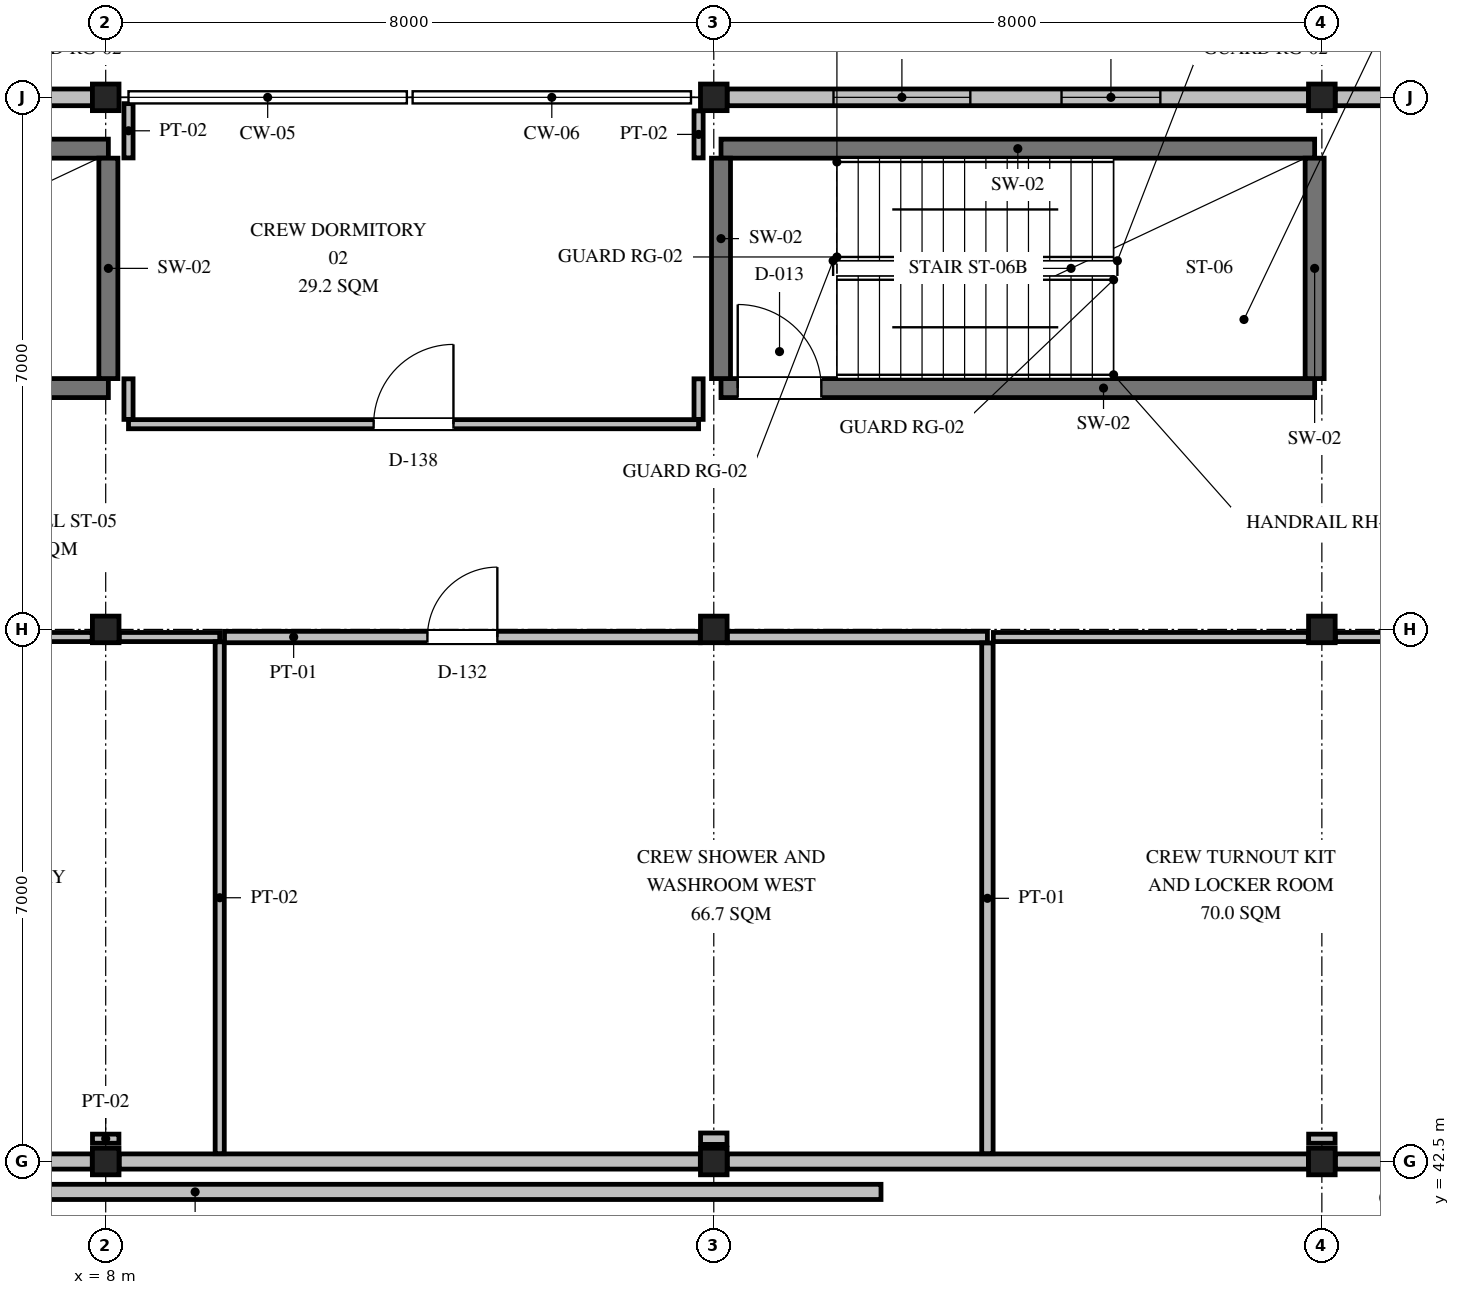
"""IFC4 building model, lengths in metres.
Left out: names, types, materials, properties, quantities, classifications, styles, units other than length and angle.
Written with IfcOpenShell. Run it as: python <this file> out.ifc"""

import sys

from ifc_helpers import new_model, si_unit, direction, frame, frame_2d, origin, origin_2d, place, context, subcontext, project, spatial, rectangle, i_section, extrude, element, fill, save


model = new_model("IFC4")
c1 = context("Model", 3, precision=1e-05, world=origin(), true_north=direction((0.0, 1.0)))
c2 = subcontext(c1, "Body", "Model", "MODEL_VIEW")
j1 = project(units=[si_unit("LENGTHUNIT", "METRE"), si_unit("PLANEANGLEUNIT", "RADIAN")], contexts=[c1])
p1 = place(None, origin())
s1 = spatial("IfcSite", under=j1, at=p1, CompositionType="ELEMENT")
p2 = place(p1, origin())
s2 = spatial("IfcBuilding", under=s1, at=p2, CompositionType="ELEMENT")
p3 = place(p2, frame((0.0, 0.0, 5.85)))
s3 = spatial("IfcBuildingStorey", under=s2, at=p3, CompositionType="ELEMENT", Elevation=5.85)
for number, where, z_axis, x_axis in (
    (1, (8.0, 42.5, 0.0), (0.0, 0.0, 1.0), (1.0, 0.0, 0.0)),
    (2, (8.0, 49.5, 0.0), (0.0, 0.0, 1.0), (1.0, 0.0, 0.0)),
    (3, (8.0, 56.5, 0.0), (0.0, 0.0, 1.0), (1.0, 0.0, 0.0)),
    (4, (16.0, 42.5, 0.0), (0.0, 0.0, 1.0), (1.0, 0.0, 0.0)),
    (5, (16.0, 49.5, 0.0), (0.0, 0.0, 1.0), (1.0, 0.0, 0.0)),
    (6, (16.0, 56.5, 0.0), (0.0, 0.0, 1.0), (1.0, 0.0, 0.0)),
    (7, (24.0, 42.5, 0.0), (0.0, 0.0, 1.0), (1.0, 0.0, 0.0)),
    (8, (24.0, 49.5, 0.0), (0.0, 0.0, 1.0), (1.0, 0.0, 0.0)),
    (9, (24.0, 56.5, 0.0), (0.0, 0.0, 1.0), (1.0, 0.0, 0.0)),
):
    element("IfcColumn", number, at=place(p3, frame(where, z_axis=z_axis, x_axis=x_axis)), inside=s3, PredefinedType="COLUMN", context=c2, shape_type="SweptSolid", body=[
        extrude(i_section(OverallWidth=0.35, OverallDepth=0.35, WebThickness=0.012, FlangeThickness=0.019, FilletRadius=0.02, at=origin_2d()), origin(), (0.0, 0.0, 1.0), 4.2),
    ])
p4 = place(p3, frame((0.175, 56.5, 0.0), z_axis=(0.0, 0.0, 1.0), x_axis=(1.0, 0.0, 0.0)))
e10 = element("IfcWall", 10, at=p4, inside=s3, PredefinedType="SOLIDWALL", context=c2, shape_type="SweptSolid", body=[
    extrude(rectangle(XDim=7.65, YDim=0.22, at=frame_2d((3.825, 0.0))), origin(), (0.0, 0.0, 1.0), 3.194),
])
p5 = place(p4, frame((1.4, 0.0, 0.95)))
e11 = element("IfcOpeningElement", 11, at=p5, cuts=e10, PredefinedType="OPENING", context=c2, shape_type="SweptSolid", body=[
    extrude(rectangle(XDim=1.0, YDim=1.5, at=frame_2d((0.5, 0.75))), frame((0.0, 0.12, 0.0), z_axis=(0.0, -1.0, 0.0), x_axis=(1.0, 0.0, 0.0)), (0.0, 0.0, 1.0), 0.24),
])
p6 = place(p4, frame((4.4, 0.0, 0.95)))
e12 = element("IfcOpeningElement", 12, at=p6, cuts=e10, PredefinedType="OPENING", context=c2, shape_type="SweptSolid", body=[
    extrude(rectangle(XDim=2.2, YDim=1.8, at=frame_2d((1.1, 0.9))), frame((0.0, 0.12, 0.0), z_axis=(0.0, -1.0, 0.0), x_axis=(1.0, 0.0, 0.0)), (0.0, 0.0, 1.0), 0.24),
])
p7 = place(p3, frame((16.175, 56.5, 0.0), z_axis=(0.0, 0.0, 1.0), x_axis=(1.0, 0.0, 0.0)))
e13 = element("IfcWall", 13, at=p7, inside=s3, PredefinedType="SOLIDWALL", context=c2, shape_type="SweptSolid", body=[
    extrude(rectangle(XDim=7.65, YDim=0.22, at=frame_2d((3.825, 0.0))), origin(), (0.0, 0.0, 1.0), 2.894),
])
p8 = place(p7, frame((1.4, 0.0, 0.95)))
e14 = element("IfcOpeningElement", 14, at=p8, cuts=e13, PredefinedType="OPENING", context=c2, shape_type="SweptSolid", body=[
    extrude(rectangle(XDim=1.8, YDim=1.5, at=frame_2d((0.9, 0.75))), frame((0.0, 0.12, 0.0), z_axis=(0.0, -1.0, 0.0), x_axis=(1.0, 0.0, 0.0)), (0.0, 0.0, 1.0), 0.24),
])
p9 = place(p7, frame((4.4, 0.0, 0.694)))
e15 = element("IfcOpeningElement", 15, at=p9, cuts=e13, PredefinedType="OPENING", context=c2, shape_type="SweptSolid", body=[
    extrude(rectangle(XDim=1.3, YDim=2.0, at=frame_2d((0.65, 1.0))), frame((0.0, 0.12, 0.0), z_axis=(0.0, -1.0, 0.0), x_axis=(1.0, 0.0, 0.0)), (0.0, 0.0, 1.0), 0.24),
])
p10 = place(p3, frame((24.175, 56.5, 0.0), z_axis=(0.0, 0.0, 1.0), x_axis=(1.0, 0.0, 0.0)))
e16 = element("IfcWall", 16, at=p10, inside=s3, PredefinedType="SOLIDWALL", context=c2, shape_type="SweptSolid", body=[
    extrude(rectangle(XDim=7.65, YDim=0.22, at=frame_2d((3.825, 0.0))), origin(), (0.0, 0.0, 1.0), 3.344),
])
p11 = place(p10, frame((1.4, 0.0, 0.95)))
e17 = element("IfcOpeningElement", 17, at=p11, cuts=e16, PredefinedType="OPENING", context=c2, shape_type="SweptSolid", body=[
    extrude(rectangle(XDim=2.4, YDim=1.5, at=frame_2d((1.2, 0.75))), frame((0.0, 0.12, 0.0), z_axis=(0.0, -1.0, 0.0), x_axis=(1.0, 0.0, 0.0)), (0.0, 0.0, 1.0), 0.24),
])
p12 = place(p10, frame((4.4, 0.0, 0.95)))
e18 = element("IfcOpeningElement", 18, at=p12, cuts=e16, PredefinedType="OPENING", context=c2, shape_type="SweptSolid", body=[
    extrude(rectangle(XDim=2.1, YDim=2.1, at=frame_2d((1.05, 1.05))), frame((0.0, 0.12, 0.0), z_axis=(0.0, -1.0, 0.0), x_axis=(1.0, 0.0, 0.0)), (0.0, 0.0, 1.0), 0.24),
])
p13 = place(p3, frame((0.225, 52.675, 0.0), z_axis=(0.0, 0.0, 1.0), x_axis=(1.0, 0.0, 0.0)))
e19 = element("IfcWall", 19, at=p13, inside=s3, PredefinedType="SHEAR", context=c2, shape_type="SweptSolid", body=[
    extrude(rectangle(XDim=7.81, YDim=0.25, at=frame_2d((3.905, 0.0))), origin(), (0.0, 0.0, 1.0), 4.0),
])
p14 = place(p13, frame((0.22, 0.0, 0.0)))
e20 = element("IfcOpeningElement", 20, at=p14, cuts=e19, PredefinedType="OPENING", context=c2, shape_type="SweptSolid", body=[
    extrude(rectangle(XDim=1.1, YDim=2.15, at=frame_2d((0.55, 1.075))), frame((0.0, 0.135, 0.0), z_axis=(0.0, -1.0, 0.0), x_axis=(1.0, 0.0, 0.0)), (0.0, 0.0, 1.0), 0.27),
])
p15 = place(p3, frame((0.225, 55.825, 0.0), z_axis=(0.0, 0.0, 1.0), x_axis=(1.0, 0.0, 0.0)))
e21 = element("IfcWall", 21, at=p15, inside=s3, PredefinedType="SHEAR", context=c2, shape_type="SweptSolid", body=[
    extrude(rectangle(XDim=7.81, YDim=0.25, at=frame_2d((3.905, 0.0))), origin(), (0.0, 0.0, 1.0), 4.0),
])
p16 = place(p3, frame((8.035, 52.8, 0.0), z_axis=(0.0, 0.0, 1.0), x_axis=(0.0, 1.0, 0.0)))
e22 = element("IfcWall", 22, at=p16, inside=s3, PredefinedType="SHEAR", context=c2, shape_type="SweptSolid", body=[
    extrude(rectangle(XDim=2.9, YDim=0.25, at=frame_2d((1.45, 0.0))), origin(), (0.0, 0.0, 1.0), 4.0),
])
p17 = place(p3, frame((16.095, 52.675, 0.0), z_axis=(0.0, 0.0, 1.0), x_axis=(1.0, 0.0, 0.0)))
e23 = element("IfcWall", 23, at=p17, inside=s3, PredefinedType="SHEAR", context=c2, shape_type="SweptSolid", body=[
    extrude(rectangle(XDim=7.81, YDim=0.25, at=frame_2d((3.905, 0.0))), origin(), (0.0, 0.0, 1.0), 4.0),
])
p18 = place(p17, frame((0.22, 0.0, 0.0)))
e24 = element("IfcOpeningElement", 24, at=p18, cuts=e23, PredefinedType="OPENING", context=c2, shape_type="SweptSolid", body=[
    extrude(rectangle(XDim=1.1, YDim=2.15, at=frame_2d((0.55, 1.075))), frame((0.0, 0.135, 0.0), z_axis=(0.0, -1.0, 0.0), x_axis=(1.0, 0.0, 0.0)), (0.0, 0.0, 1.0), 0.27),
])
p19 = place(p3, frame((16.095, 55.825, 0.0), z_axis=(0.0, 0.0, 1.0), x_axis=(1.0, 0.0, 0.0)))
e25 = element("IfcWall", 25, at=p19, inside=s3, PredefinedType="SHEAR", context=c2, shape_type="SweptSolid", body=[
    extrude(rectangle(XDim=7.81, YDim=0.25, at=frame_2d((3.905, 0.0))), origin(), (0.0, 0.0, 1.0), 4.0),
])
for number, where, z_axis, x_axis in (
    (26, (16.095, 52.8, 0.0), (0.0, 0.0, 1.0), (0.0, 1.0, 0.0)),
    (27, (23.905, 52.8, 0.0), (0.0, 0.0, 1.0), (0.0, 1.0, 0.0)),
):
    element("IfcWall", number, at=place(p3, frame(where, z_axis=z_axis, x_axis=x_axis)), inside=s3, PredefinedType="SHEAR", context=c2, shape_type="SweptSolid", body=[
        extrude(rectangle(XDim=2.9, YDim=0.25, at=frame_2d((1.45, 0.0))), origin(), (0.0, 0.0, 1.0), 4.0),
    ])
p20 = place(p3, frame((0.177, 42.5, 0.0), z_axis=(0.0, 0.0, 1.0), x_axis=(1.0, 0.0, 0.0)))
e28 = element("IfcWall", 28, at=p20, inside=s3, PredefinedType="PARTITIONING", context=c2, shape_type="SweptSolid", body=[
    extrude(rectangle(XDim=7.646, YDim=0.2, at=frame_2d((3.823, 0.0))), origin(), (0.0, 0.0, 1.0), 3.494),
])
p21 = place(p3, frame((8.177, 42.5, 0.0), z_axis=(0.0, 0.0, 1.0), x_axis=(1.0, 0.0, 0.0)))
e29 = element("IfcWall", 29, at=p21, inside=s3, PredefinedType="PARTITIONING", context=c2, shape_type="SweptSolid", body=[
    extrude(rectangle(XDim=7.646, YDim=0.2, at=frame_2d((3.823, 0.0))), origin(), (0.0, 0.0, 1.0), 3.544),
])
p22 = place(p3, frame((16.177, 42.5, 0.0), z_axis=(0.0, 0.0, 1.0), x_axis=(1.0, 0.0, 0.0)))
e30 = element("IfcWall", 30, at=p22, inside=s3, PredefinedType="PARTITIONING", context=c2, shape_type="SweptSolid", body=[
    extrude(rectangle(XDim=7.646, YDim=0.2, at=frame_2d((3.823, 0.0))), origin(), (0.0, 0.0, 1.0), 3.494),
])
p23 = place(p3, frame((24.177, 42.5, 0.0), z_axis=(0.0, 0.0, 1.0), x_axis=(1.0, 0.0, 0.0)))
e31 = element("IfcWall", 31, at=p23, inside=s3, PredefinedType="PARTITIONING", context=c2, shape_type="SweptSolid", body=[
    extrude(rectangle(XDim=7.646, YDim=0.2, at=frame_2d((3.823, 0.0))), origin(), (0.0, 0.0, 1.0), 3.594),
])
p24 = place(p3, frame((0.153, 42.1, 0.0), z_axis=(0.0, 0.0, 1.0), x_axis=(1.0, 0.0, 0.0)))
e32 = element("IfcWall", 32, at=p24, inside=s3, PredefinedType="PARTITIONING", context=c2, shape_type="SweptSolid", body=[
    extrude(rectangle(XDim=18.047, YDim=0.2, at=frame_2d((9.023, 0.0))), origin(), (0.0, 0.0, 1.0), 4.0),
])
p25 = place(p3, frame((7.826, 42.8, 0.0), z_axis=(0.0, 0.0, 1.0), x_axis=(1.0, 0.0, 0.0)))
e33 = element("IfcWall", 33, at=p25, inside=s3, PredefinedType="PARTITIONING", context=c2, shape_type="SweptSolid", body=[
    extrude(rectangle(XDim=0.348, YDim=0.12, at=frame_2d((0.174, 0.0))), origin(), (0.0, 0.0, 1.0), 4.0),
])
p26 = place(p3, frame((0.178, 49.4, 0.0), z_axis=(0.0, 0.0, 1.0), x_axis=(1.0, 0.0, 0.0)))
e34 = element("IfcWall", 34, at=p26, inside=s3, PredefinedType="PARTITIONING", context=c2, shape_type="SweptSolid", body=[
    extrude(rectangle(XDim=7.644, YDim=0.12, at=frame_2d((3.822, 0.0))), origin(), (0.0, 0.0, 1.0), 3.344),
])
p27 = place(p26, frame((3.297, 0.0, 0.0)))
e35 = element("IfcOpeningElement", 35, at=p27, cuts=e34, PredefinedType="OPENING", context=c2, shape_type="SweptSolid", body=[
    extrude(rectangle(XDim=1.05, YDim=2.1, at=frame_2d((0.525, 1.05))), frame((0.0, 0.07, 0.0), z_axis=(0.0, -1.0, 0.0), x_axis=(1.0, 0.0, 0.0)), (0.0, 0.0, 1.0), 0.14),
])
p28 = place(p3, frame((8.178, 49.4, 0.0), z_axis=(0.0, 0.0, 1.0), x_axis=(1.0, 0.0, 0.0)))
e36 = element("IfcWall", 36, at=p28, inside=s3, PredefinedType="PARTITIONING", context=c2, shape_type="SweptSolid", body=[
    extrude(rectangle(XDim=1.322, YDim=0.12, at=frame_2d((0.661, 0.0))), origin(), (0.0, 0.0, 1.0), 3.394),
])
p29 = place(p3, frame((9.5, 42.603, 0.0), z_axis=(0.0, 0.0, 1.0), x_axis=(0.0, 1.0, 0.0)))
e37 = element("IfcWall", 37, at=p29, inside=s3, PredefinedType="PARTITIONING", context=c2, shape_type="SweptSolid", body=[
    extrude(rectangle(XDim=6.734, YDim=0.12, at=frame_2d((3.367, 0.0))), origin(), (0.0, 0.0, 1.0), 3.7),
])
p30 = place(p3, frame((15.826, 42.8, 0.0), z_axis=(0.0, 0.0, 1.0), x_axis=(1.0, 0.0, 0.0)))
e38 = element("IfcWall", 38, at=p30, inside=s3, PredefinedType="PARTITIONING", context=c2, shape_type="SweptSolid", body=[
    extrude(rectangle(XDim=0.348, YDim=0.15, at=frame_2d((0.174, 0.0))), origin(), (0.0, 0.0, 1.0), 4.0),
])
p31 = place(p3, frame((9.563, 49.4, 0.0), z_axis=(0.0, 0.0, 1.0), x_axis=(1.0, 0.0, 0.0)))
e39 = element("IfcWall", 39, at=p31, inside=s3, PredefinedType="PARTITIONING", context=c2, shape_type="SweptSolid", body=[
    extrude(rectangle(XDim=6.259, YDim=0.15, at=frame_2d((3.129, 0.0))), origin(), (0.0, 0.0, 1.0), 3.394),
])
p32 = place(p31, frame((2.669, 0.0, 0.0)))
e40 = element("IfcOpeningElement", 40, at=p32, cuts=e39, PredefinedType="OPENING", context=c2, shape_type="SweptSolid", body=[
    extrude(rectangle(XDim=0.92, YDim=2.1, at=frame_2d((0.46, 1.05))), frame((0.0, 0.085, 0.0), z_axis=(0.0, -1.0, 0.0), x_axis=(1.0, 0.0, 0.0)), (0.0, 0.0, 1.0), 0.17),
])
p33 = place(p3, frame((16.178, 49.4, 0.0), z_axis=(0.0, 0.0, 1.0), x_axis=(1.0, 0.0, 0.0)))
e41 = element("IfcWall", 41, at=p33, inside=s3, PredefinedType="PARTITIONING", context=c2, shape_type="SweptSolid", body=[
    extrude(rectangle(XDim=3.422, YDim=0.15, at=frame_2d((1.711, 0.0))), origin(), (0.0, 0.0, 1.0), 3.444),
])
p34 = place(p3, frame((19.6, 42.603, 0.0), z_axis=(0.0, 0.0, 1.0), x_axis=(0.0, 1.0, 0.0)))
e42 = element("IfcWall", 42, at=p34, inside=s3, PredefinedType="PARTITIONING", context=c2, shape_type="SweptSolid", body=[
    extrude(rectangle(XDim=6.719, YDim=0.15, at=frame_2d((3.359, 0.0))), origin(), (0.0, 0.0, 1.0), 4.0),
])
p35 = place(p3, frame((23.826, 42.8, 0.0), z_axis=(0.0, 0.0, 1.0), x_axis=(1.0, 0.0, 0.0)))
e43 = element("IfcWall", 43, at=p35, inside=s3, PredefinedType="PARTITIONING", context=c2, shape_type="SweptSolid", body=[
    extrude(rectangle(XDim=0.348, YDim=0.12, at=frame_2d((0.174, 0.0))), origin(), (0.0, 0.0, 1.0), 4.0),
])
p36 = place(p3, frame((19.678, 49.4, 0.0), z_axis=(0.0, 0.0, 1.0), x_axis=(1.0, 0.0, 0.0)))
e44 = element("IfcWall", 44, at=p36, inside=s3, PredefinedType="PARTITIONING", context=c2, shape_type="SweptSolid", body=[
    extrude(rectangle(XDim=4.144, YDim=0.12, at=frame_2d((2.072, 0.0))), origin(), (0.0, 0.0, 1.0), 3.444),
])
p37 = place(p3, frame((24.178, 49.4, 0.0), z_axis=(0.0, 0.0, 1.0), x_axis=(1.0, 0.0, 0.0)))
e45 = element("IfcWall", 45, at=p37, inside=s3, PredefinedType="PARTITIONING", context=c2, shape_type="SweptSolid", body=[
    extrude(rectangle(XDim=6.022, YDim=0.12, at=frame_2d((3.011, 0.0))), origin(), (0.0, 0.0, 1.0), 3.494),
])
p38 = place(p37, frame((2.261, 0.0, 0.0)))
e46 = element("IfcOpeningElement", 46, at=p38, cuts=e45, PredefinedType="OPENING", context=c2, shape_type="SweptSolid", body=[
    extrude(rectangle(XDim=1.5, YDim=2.25, at=frame_2d((0.75, 1.125))), frame((0.0, 0.07, 0.0), z_axis=(0.0, -1.0, 0.0), x_axis=(1.0, 0.0, 0.0)), (0.0, 0.0, 1.0), 0.14),
])
p39 = place(p3, frame((8.3, 52.2, 0.0), z_axis=(0.0, 0.0, 1.0), x_axis=(1.0, 0.0, 0.0)))
e47 = element("IfcWall", 47, at=p39, inside=s3, PredefinedType="PARTITIONING", context=c2, shape_type="SweptSolid", body=[
    extrude(rectangle(XDim=7.5, YDim=0.12, at=frame_2d((3.75, 0.0))), origin(), (0.0, 0.0, 1.0), 4.0),
])
p40 = place(p39, frame((3.225, 0.0, 0.0)))
e48 = element("IfcOpeningElement", 48, at=p40, cuts=e47, PredefinedType="OPENING", context=c2, shape_type="SweptSolid", body=[
    extrude(rectangle(XDim=1.05, YDim=2.1, at=frame_2d((0.525, 1.05))), frame((0.0, 0.07, 0.0), z_axis=(0.0, -1.0, 0.0), x_axis=(1.0, 0.0, 0.0)), (0.0, 0.0, 1.0), 0.14),
])
p41 = place(p3, frame((8.3, 52.263, 0.0), z_axis=(0.0, 0.0, 1.0), x_axis=(0.0, 1.0, 0.0)))
e49 = element("IfcWall", 49, at=p41, inside=s3, PredefinedType="PARTITIONING", context=c2, shape_type="SweptSolid", body=[
    extrude(rectangle(XDim=0.534, YDim=0.12, at=frame_2d((0.267, 0.0))), origin(), (0.0, 0.0, 1.0), 4.0),
])
p42 = place(p3, frame((8.3, 55.703, 0.0), z_axis=(0.0, 0.0, 1.0), x_axis=(0.0, 1.0, 0.0)))
e50 = element("IfcWall", 50, at=p42, inside=s3, PredefinedType="PARTITIONING", context=c2, shape_type="SweptSolid", body=[
    extrude(rectangle(XDim=0.714, YDim=0.12, at=frame_2d((0.357, 0.0))), origin(), (0.0, 0.0, 1.0), 4.0),
])
p43 = place(p3, frame((15.8, 52.263, 0.0), z_axis=(0.0, 0.0, 1.0), x_axis=(0.0, 1.0, 0.0)))
e51 = element("IfcWall", 51, at=p43, inside=s3, PredefinedType="PARTITIONING", context=c2, shape_type="SweptSolid", body=[
    extrude(rectangle(XDim=0.534, YDim=0.12, at=frame_2d((0.267, 0.0))), origin(), (0.0, 0.0, 1.0), 4.0),
])
p44 = place(p3, frame((15.8, 55.703, 0.0), z_axis=(0.0, 0.0, 1.0), x_axis=(0.0, 1.0, 0.0)))
e52 = element("IfcWall", 52, at=p44, inside=s3, PredefinedType="PARTITIONING", context=c2, shape_type="SweptSolid", body=[
    extrude(rectangle(XDim=0.619, YDim=0.12, at=frame_2d((0.31, 0.0))), origin(), (0.0, 0.0, 1.0), 4.0),
])
p45 = place(p8, origin())
e53 = element("IfcWindow", 53, at=p45, inside=s3, PartitioningType="SINGLE_PANEL", PredefinedType="WINDOW", context=c2, shape_type="SweptSolid", body=[
    extrude(rectangle(XDim=1.8, YDim=1.5, at=frame_2d((0.9, 0.75))), frame((0.0, 0.03, 0.0), z_axis=(0.0, -1.0, 0.0), x_axis=(1.0, 0.0, 0.0)), (0.0, 0.0, 1.0), 0.06),
])
fill(e14, e53)
p46 = place(p9, origin())
e54 = element("IfcWindow", 54, at=p46, inside=s3, PartitioningType="SINGLE_PANEL", PredefinedType="WINDOW", context=c2, shape_type="SweptSolid", body=[
    extrude(rectangle(XDim=1.3, YDim=2.0, at=frame_2d((0.65, 1.0))), frame((0.0, 0.03, 0.0), z_axis=(0.0, -1.0, 0.0), x_axis=(1.0, 0.0, 0.0)), (0.0, 0.0, 1.0), 0.06),
])
fill(e15, e54)
p47 = place(p18, frame((1.1, 0.0, 0.0), z_axis=(0.0, 0.0, 1.0), x_axis=(-1.0, 0.0, 0.0)))
e55 = element("IfcDoor", 55, at=p47, inside=s3, OperationType="SINGLE_SWING_LEFT", PredefinedType="DOOR", context=c2, shape_type="SweptSolid", body=[
    extrude(rectangle(XDim=1.1, YDim=2.15, at=frame_2d((0.55, 1.075))), frame((0.0, 0.025, 0.0), z_axis=(0.0, -1.0, 0.0), x_axis=(1.0, 0.0, 0.0)), (0.0, 0.0, 1.0), 0.05),
])
fill(e24, e55)
p48 = place(p32, origin())
e56 = element("IfcDoor", 56, at=p48, inside=s3, OperationType="SINGLE_SWING_RIGHT", PredefinedType="DOOR", context=c2, shape_type="SweptSolid", body=[
    extrude(rectangle(XDim=0.92, YDim=2.1, at=frame_2d((0.46, 1.05))), frame((0.0, 0.025, 0.0), z_axis=(0.0, -1.0, 0.0), x_axis=(1.0, 0.0, 0.0)), (0.0, 0.0, 1.0), 0.05),
])
fill(e40, e56)
p49 = place(p40, origin())
e57 = element("IfcDoor", 57, at=p49, inside=s3, OperationType="SINGLE_SWING_RIGHT", PredefinedType="DOOR", context=c2, shape_type="SweptSolid", body=[
    extrude(rectangle(XDim=1.05, YDim=2.1, at=frame_2d((0.525, 1.05))), frame((0.0, 0.025, 0.0), z_axis=(0.0, -1.0, 0.0), x_axis=(1.0, 0.0, 0.0)), (0.0, 0.0, 1.0), 0.05),
])
fill(e48, e57)
save(model, sys.argv[1])
